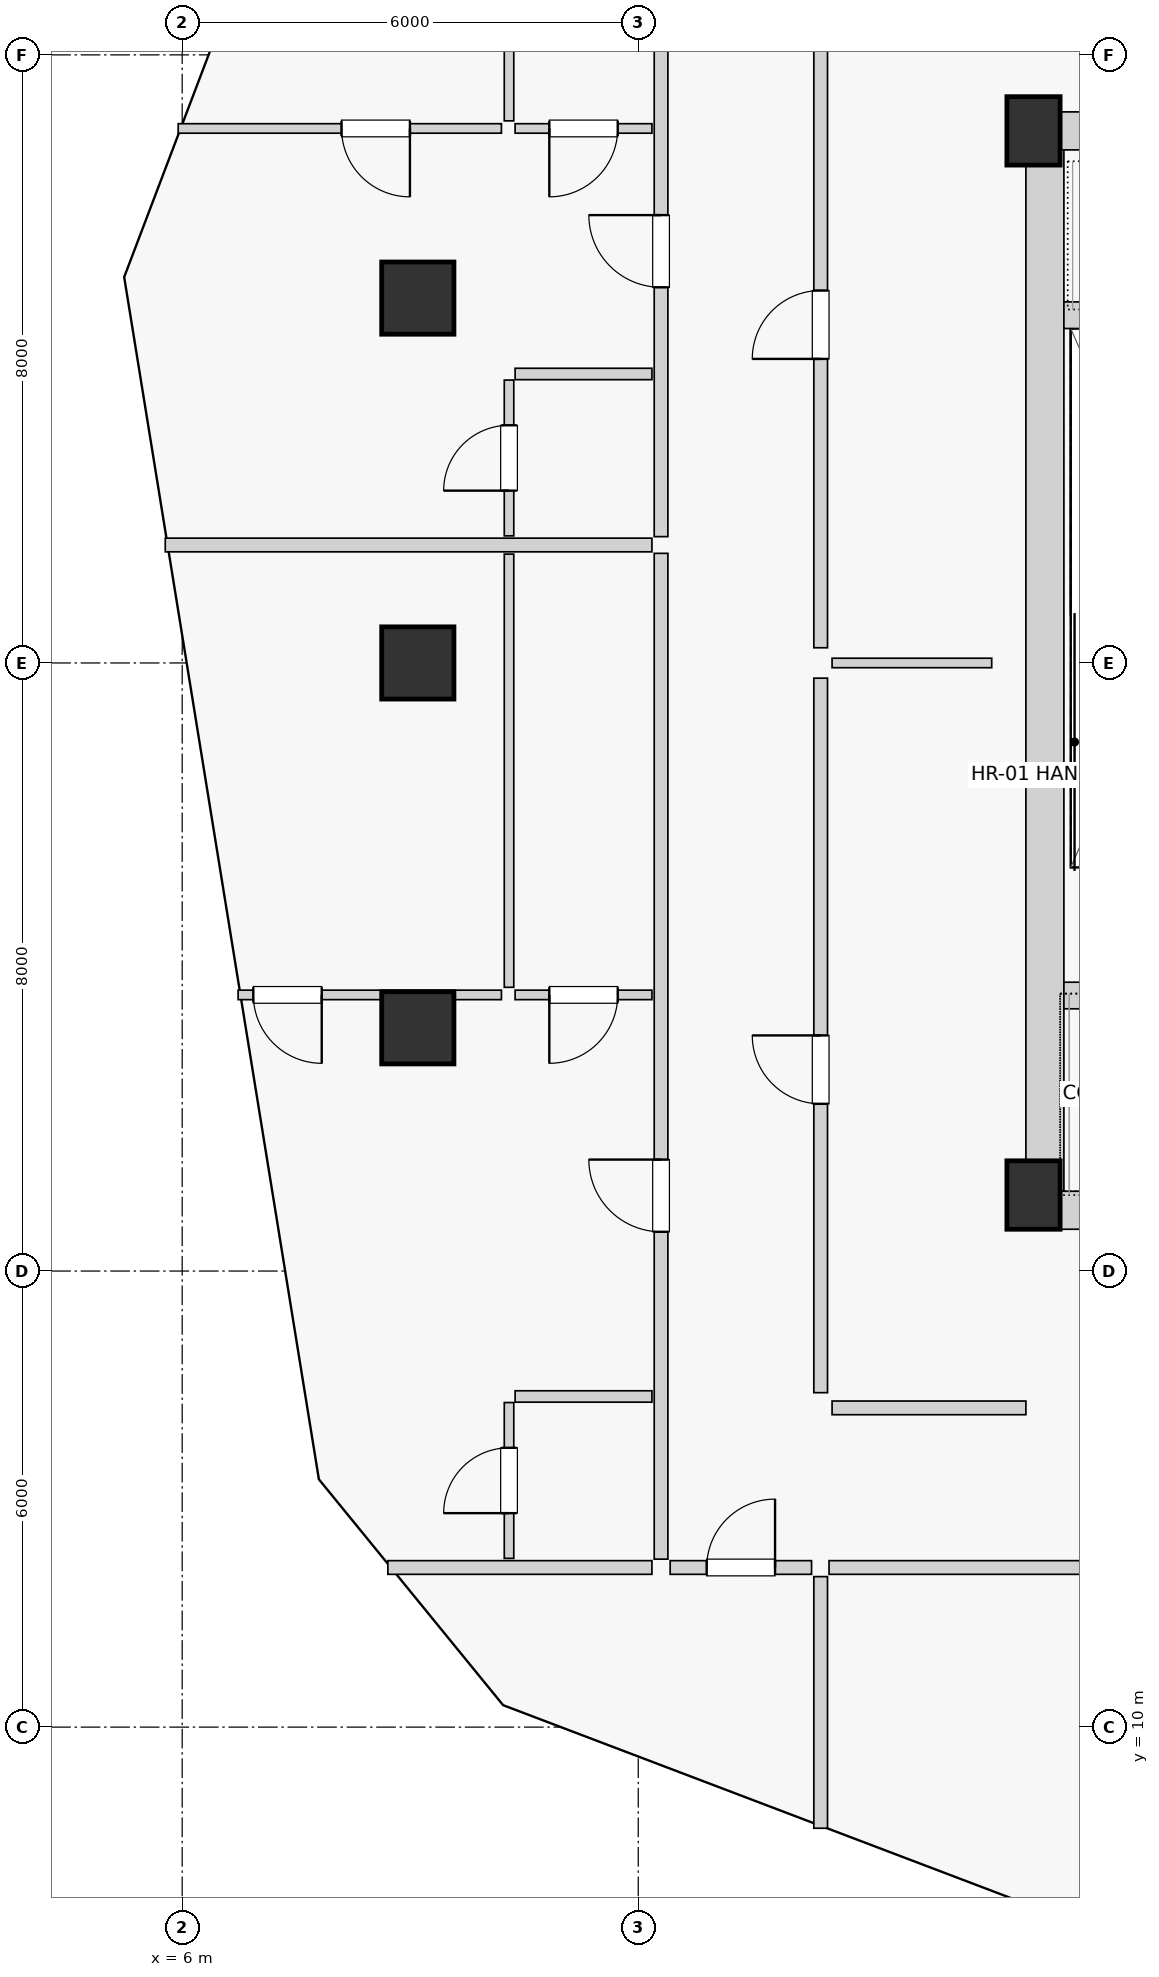
"""IFC4 building model, lengths in metres.
Left out: names, types, materials, properties, quantities, classifications, styles, units other than length and angle.
Written with IfcOpenShell. Run it as: python <this file> out.ifc"""

import sys

from ifc_helpers import new_model, si_unit, direction, frame, frame_2d, origin, origin_2d, place, context, subcontext, project, spatial, rectangle, extrude, source, transform, mapped, element, fill, save


model = new_model("IFC4")
c1 = context("Model", 3, precision=1e-05, world=origin(), true_north=direction((0.0, 1.0)))
c2 = subcontext(c1, "Body", "Model", "MODEL_VIEW")
j1 = project(units=[si_unit("LENGTHUNIT", "METRE"), si_unit("PLANEANGLEUNIT", "RADIAN")], contexts=[c1])
p1 = place(None, origin())
s1 = spatial("IfcSite", under=j1, at=p1, CompositionType="ELEMENT")
p2 = place(p1, origin())
s2 = spatial("IfcBuilding", under=s1, at=p2, CompositionType="ELEMENT")
p3 = place(p2, frame((0.0, 0.0, 174.35)))
s3 = spatial("IfcBuildingStorey", under=s2, at=p3, CompositionType="ELEMENT", Elevation=174.35)
for number, where, z_axis, x_axis in (
    (1, (17.2, 17.0, 0.0), (0.0, 0.0, 1.0), (1.0, 0.0, 0.0)),
    (2, (17.2, 31.0, 0.0), (0.0, 0.0, 1.0), (1.0, 0.0, 0.0)),
):
    element("IfcColumn", number, at=place(p3, frame(where, z_axis=z_axis, x_axis=x_axis)), inside=s3, PredefinedType="PILASTER", context=c2, shape_type="SweptSolid", body=[
        extrude(rectangle(XDim=0.7, YDim=0.9, at=origin_2d()), origin(), (0.0, 0.0, 1.0), 4.5),
    ])
for number, where, z_axis, x_axis in (
    (3, (9.1, 28.8, -0.32), (0.0, 0.0, 1.0), (1.0, 0.0, 0.0)),
    (4, (9.1, 24.0, -0.32), (0.0, 0.0, 1.0), (1.0, 0.0, 0.0)),
    (5, (9.1, 19.2, -0.32), (0.0, 0.0, 1.0), (1.0, 0.0, 0.0)),
):
    element("IfcColumn", number, at=place(p3, frame(where, z_axis=z_axis, x_axis=x_axis)), inside=s3, PredefinedType="COLUMN", context=c2, shape_type="SweptSolid", body=[
        extrude(rectangle(XDim=0.95, YDim=0.95, at=origin_2d()), origin(), (0.0, 0.0, 1.0), 4.82),
    ])
p4 = place(p3, frame((17.35, 16.8, 0.0), z_axis=(0.0, 0.0, 1.0), x_axis=(0.0, 1.0, 0.0)))
e6 = element("IfcWall", 6, at=p4, inside=s3, PredefinedType="SHEAR", context=c2, shape_type="SweptSolid", body=[
    extrude(rectangle(XDim=14.2, YDim=0.5, at=frame_2d((7.1, 0.0))), origin(), (0.0, 0.0, 1.0), 4.265),
])
p5 = place(p3, frame((17.2, 16.8, 0.0), z_axis=(0.0, 0.0, 1.0), x_axis=(1.0, 0.0, 0.0)))
e7 = element("IfcWall", 7, at=p5, inside=s3, PredefinedType="SHEAR", context=c2, shape_type="SweptSolid", body=[
    extrude(rectangle(XDim=5.85, YDim=0.5, at=frame_2d((2.925, 0.0))), origin(), (0.0, 0.0, 1.0), 4.265),
])
p6 = place(p5, frame((1.15, 0.0, 0.0)))
e8 = element("IfcOpeningElement", 8, at=p6, cuts=e7, PredefinedType="OPENING", context=c2, shape_type="SweptSolid", body=[
    extrude(rectangle(XDim=1.2, YDim=2.03, at=frame_2d((0.6, 1.015))), frame((0.0, 0.26, 0.0), z_axis=(0.0, -1.0, 0.0), x_axis=(1.0, 0.0, 0.0)), (0.0, 0.0, 1.0), 0.52),
])
p7 = place(p3, frame((17.2, 31.0, 0.0), z_axis=(0.0, 0.0, 1.0), x_axis=(1.0, 0.0, 0.0)))
e9 = element("IfcWall", 9, at=p7, inside=s3, PredefinedType="SHEAR", context=c2, shape_type="SweptSolid", body=[
    extrude(rectangle(XDim=3.8, YDim=0.5, at=frame_2d((1.9, 0.0))), origin(), (0.0, 0.0, 1.0), 4.265),
])
p8 = place(p7, frame((1.25, 0.0, 0.0)))
e10 = element("IfcOpeningElement", 10, at=p8, cuts=e9, PredefinedType="OPENING", context=c2, shape_type="SweptSolid", body=[
    extrude(rectangle(XDim=0.86, YDim=2.01, at=frame_2d((0.43, 1.005))), frame((0.0, 0.26, 0.0), z_axis=(0.0, -1.0, 0.0), x_axis=(1.0, 0.0, 0.0)), (0.0, 0.0, 1.0), 0.52),
])
p9 = place(p3, frame((17.6, 19.625, 0.0), z_axis=(0.0, 0.0, 1.0), x_axis=(1.0, 0.0, 0.0)))
e11 = element("IfcWall", 11, at=p9, inside=s3, PredefinedType="SHEAR", context=c2, shape_type="SweptSolid", body=[
    extrude(rectangle(XDim=3.375, YDim=0.35, at=frame_2d((1.688, 0.0))), origin(), (0.0, 0.0, 1.0), 4.265),
])
p10 = place(p9, frame((1.05, 0.0, 0.0)))
e12 = element("IfcOpeningElement", 12, at=p10, cuts=e11, PredefinedType="OPENING", context=c2, shape_type="SweptSolid", body=[
    extrude(rectangle(XDim=1.1, YDim=2.03, at=frame_2d((0.55, 1.015))), frame((0.0, 0.185, 0.0), z_axis=(0.0, -1.0, 0.0), x_axis=(1.0, 0.0, 0.0)), (0.0, 0.0, 1.0), 0.37),
])
p11 = place(p3, frame((17.6, 28.575, 0.0), z_axis=(0.0, 0.0, 1.0), x_axis=(1.0, 0.0, 0.0)))
e13 = element("IfcWall", 13, at=p11, inside=s3, PredefinedType="SHEAR", context=c2, shape_type="SweptSolid", body=[
    extrude(rectangle(XDim=3.375, YDim=0.35, at=frame_2d((1.688, 0.0))), origin(), (0.0, 0.0, 1.0), 4.265),
])
p12 = place(p3, frame((14.4, 14.4, 0.0), z_axis=(0.0, 0.0, 1.0), x_axis=(0.0, 1.0, 0.0)))
e14 = element("IfcWall", 14, at=p12, inside=s3, PredefinedType="PARTITIONING", context=c2, shape_type="SweptSolid", body=[
    extrude(rectangle(XDim=9.4, YDim=0.18, at=frame_2d((4.7, 0.0))), origin(), (0.0, 0.0, 1.0), 4.265),
])
p13 = place(p12, frame((3.8, 0.0, 0.0)))
e15 = element("IfcOpeningElement", 15, at=p13, cuts=e14, PredefinedType="OPENING", context=c2, shape_type="SweptSolid", body=[
    extrude(rectangle(XDim=0.9, YDim=2.01, at=frame_2d((0.45, 1.005))), frame((0.0, 0.1, 0.0), z_axis=(0.0, -1.0, 0.0), x_axis=(1.0, 0.0, 0.0)), (0.0, 0.0, 1.0), 0.2),
])
p14 = place(p3, frame((14.4, 24.2, 0.0), z_axis=(0.0, 0.0, 1.0), x_axis=(0.0, 1.0, 0.0)))
e16 = element("IfcWall", 16, at=p14, inside=s3, PredefinedType="PARTITIONING", context=c2, shape_type="SweptSolid", body=[
    extrude(rectangle(XDim=9.2, YDim=0.18, at=frame_2d((4.6, 0.0))), origin(), (0.0, 0.0, 1.0), 4.265),
])
p15 = place(p14, frame((3.8, 0.0, 0.0)))
e17 = element("IfcOpeningElement", 17, at=p15, cuts=e16, PredefinedType="OPENING", context=c2, shape_type="SweptSolid", body=[
    extrude(rectangle(XDim=0.9, YDim=2.01, at=frame_2d((0.45, 1.005))), frame((0.0, 0.1, 0.0), z_axis=(0.0, -1.0, 0.0), x_axis=(1.0, 0.0, 0.0)), (0.0, 0.0, 1.0), 0.2),
])
p16 = place(p3, frame((14.55, 24.0, 0.0), z_axis=(0.0, 0.0, 1.0), x_axis=(1.0, 0.0, 0.0)))
e18 = element("IfcWall", 18, at=p16, inside=s3, PredefinedType="PARTITIONING", context=c2, shape_type="SweptSolid", body=[
    extrude(rectangle(XDim=2.1, YDim=0.125, at=frame_2d((1.05, 0.0))), origin(), (0.0, 0.0, 1.0), 4.265),
])
p17 = place(p3, frame((14.55, 14.2, 0.0), z_axis=(0.0, 0.0, 1.0), x_axis=(1.0, 0.0, 0.0)))
e19 = element("IfcWall", 19, at=p17, inside=s3, PredefinedType="PARTITIONING", context=c2, shape_type="SweptSolid", body=[
    extrude(rectangle(XDim=2.55, YDim=0.18, at=frame_2d((1.275, 0.0))), origin(), (0.0, 0.0, 1.0), 4.265),
])
p18 = place(p3, frame((14.4, 11.98, 0.0), z_axis=(0.0, 0.0, 1.0), x_axis=(0.0, -1.0, 0.0)))
e20 = element("IfcWall", 20, at=p18, inside=s3, PredefinedType="PARTITIONING", context=c2, shape_type="SweptSolid", body=[
    extrude(rectangle(XDim=3.31, YDim=0.18, at=frame_2d((1.655, 0.0))), origin(), (0.0, 0.0, 1.0), 4.265),
])
p19 = place(p3, frame((14.51, 12.1, 0.0), z_axis=(0.0, 0.0, 1.0), x_axis=(1.0, 0.0, 0.0)))
e21 = element("IfcWall", 21, at=p19, inside=s3, PredefinedType="PARTITIONING", context=c2, shape_type="SweptSolid", body=[
    extrude(rectangle(XDim=10.724, YDim=0.18, at=frame_2d((5.362, 0.0))), origin(), (0.0, 0.0, 1.0), 4.265),
])
p20 = place(p19, frame((4.462, 0.0, 0.0)))
e22 = element("IfcOpeningElement", 22, at=p20, cuts=e21, PredefinedType="OPENING", context=c2, shape_type="SweptSolid", body=[
    extrude(rectangle(XDim=1.8, YDim=2.25, at=frame_2d((0.9, 1.125))), frame((0.0, 0.1, 0.0), z_axis=(0.0, -1.0, 0.0), x_axis=(1.0, 0.0, 0.0)), (0.0, 0.0, 1.0), 0.2),
])
p21 = place(p3, frame((12.18, 12.1, 0.0), z_axis=(0.0, 0.0, 1.0), x_axis=(-1.0, 0.0, 0.0)))
e23 = element("IfcWall", 23, at=p21, inside=s3, PredefinedType="PARTITIONING", context=c2, shape_type="SweptSolid", body=[
    extrude(rectangle(XDim=3.474, YDim=0.18, at=frame_2d((1.737, 0.0))), origin(), (0.0, 0.0, 1.0), 4.265),
])
p22 = place(p3, frame((12.3, 12.21, 0.0), z_axis=(0.0, 0.0, 1.0), x_axis=(0.0, 1.0, 0.0)))
e24 = element("IfcWall", 24, at=p22, inside=s3, PredefinedType="PARTITIONING", context=c2, shape_type="SweptSolid", body=[
    extrude(rectangle(XDim=13.232, YDim=0.18, at=frame_2d((6.616, 0.0))), origin(), (0.0, 0.0, 1.0), 4.265),
])
p23 = place(p22, frame((4.306, 0.0, 0.0)))
e25 = element("IfcOpeningElement", 25, at=p23, cuts=e24, PredefinedType="OPENING", context=c2, shape_type="SweptSolid", body=[
    extrude(rectangle(XDim=0.95, YDim=2.02, at=frame_2d((0.475, 1.01))), frame((0.0, 0.1, 0.0), z_axis=(0.0, -1.0, 0.0), x_axis=(1.0, 0.0, 0.0)), (0.0, 0.0, 1.0), 0.2),
])
p24 = place(p3, frame((12.18, 14.35, 0.0), z_axis=(0.0, 0.0, 1.0), x_axis=(-1.0, 0.0, 0.0)))
e26 = element("IfcWall", 26, at=p24, inside=s3, PredefinedType="PARTITIONING", context=c2, shape_type="SweptSolid", body=[
    extrude(rectangle(XDim=1.8, YDim=0.15, at=frame_2d((0.9, 0.0))), origin(), (0.0, 0.0, 1.0), 4.265),
])
p25 = place(p3, frame((10.3, 12.22, 0.0), z_axis=(0.0, 0.0, 1.0), x_axis=(0.0, 1.0, 0.0)))
e27 = element("IfcWall", 27, at=p25, inside=s3, PredefinedType="PARTITIONING", context=c2, shape_type="SweptSolid", body=[
    extrude(rectangle(XDim=2.05, YDim=0.125, at=frame_2d((1.025, 0.0))), origin(), (0.0, 0.0, 1.0), 4.265),
])
p26 = place(p25, frame((0.595, 0.0, 0.0)))
e28 = element("IfcOpeningElement", 28, at=p26, cuts=e27, PredefinedType="OPENING", context=c2, shape_type="SweptSolid", body=[
    extrude(rectangle(XDim=0.86, YDim=2.01, at=frame_2d((0.43, 1.005))), frame((0.0, 0.073, 0.0), z_axis=(0.0, -1.0, 0.0), x_axis=(1.0, 0.0, 0.0)), (0.0, 0.0, 1.0), 0.145),
])
p27 = place(p3, frame((12.18, 19.633, 0.0), z_axis=(0.0, 0.0, 1.0), x_axis=(-1.0, 0.0, 0.0)))
e29 = element("IfcWall", 29, at=p27, inside=s3, PredefinedType="PARTITIONING", context=c2, shape_type="SweptSolid", body=[
    extrude(rectangle(XDim=1.8, YDim=0.125, at=frame_2d((0.9, 0.0))), origin(), (0.0, 0.0, 1.0), 4.265),
])
p28 = place(p27, frame((0.45, 0.0, 0.0)))
e30 = element("IfcOpeningElement", 30, at=p28, cuts=e29, PredefinedType="OPENING", context=c2, shape_type="SweptSolid", body=[
    extrude(rectangle(XDim=0.9, YDim=2.01, at=frame_2d((0.45, 1.005))), frame((0.0, 0.073, 0.0), z_axis=(0.0, -1.0, 0.0), x_axis=(1.0, 0.0, 0.0)), (0.0, 0.0, 1.0), 0.145),
])
p29 = place(p3, frame((10.3, 19.733, 0.0), z_axis=(0.0, 0.0, 1.0), x_axis=(0.0, 1.0, 0.0)))
e31 = element("IfcWall", 31, at=p29, inside=s3, PredefinedType="PARTITIONING", context=c2, shape_type="SweptSolid", body=[
    extrude(rectangle(XDim=5.699, YDim=0.125, at=frame_2d((2.85, 0.0))), origin(), (0.0, 0.0, 1.0), 4.265),
])
p30 = place(p3, frame((10.2, 19.633, 0.0), z_axis=(0.0, 0.0, 1.0), x_axis=(-1.0, 0.0, 0.0)))
e32 = element("IfcWall", 32, at=p30, inside=s3, PredefinedType="PARTITIONING", context=c2, shape_type="SweptSolid", body=[
    extrude(rectangle(XDim=3.464, YDim=0.125, at=frame_2d((1.732, 0.0))), origin(), (0.0, 0.0, 1.0), 3.719),
])
p31 = place(p30, frame((2.364, 0.0, 0.0)))
e33 = element("IfcOpeningElement", 33, at=p31, cuts=e32, PredefinedType="OPENING", context=c2, shape_type="SweptSolid", body=[
    extrude(rectangle(XDim=0.9, YDim=2.01, at=frame_2d((0.45, 1.005))), frame((0.0, 0.073, 0.0), z_axis=(0.0, -1.0, 0.0), x_axis=(1.0, 0.0, 0.0)), (0.0, 0.0, 1.0), 0.145),
])
p32 = place(p3, frame((12.18, 25.552, 0.0), z_axis=(0.0, 0.0, 1.0), x_axis=(-1.0, 0.0, 0.0)))
e34 = element("IfcWall", 34, at=p32, inside=s3, PredefinedType="PARTITIONING", context=c2, shape_type="SweptSolid", body=[
    extrude(rectangle(XDim=6.403, YDim=0.18, at=frame_2d((3.201, 0.0))), origin(), (0.0, 0.0, 1.0), 4.265),
])
p33 = place(p3, frame((12.3, 25.662, 0.0), z_axis=(0.0, 0.0, 1.0), x_axis=(0.0, 1.0, 0.0)))
e35 = element("IfcWall", 35, at=p33, inside=s3, PredefinedType="PARTITIONING", context=c2, shape_type="SweptSolid", body=[
    extrude(rectangle(XDim=9.928, YDim=0.18, at=frame_2d((4.964, 0.0))), origin(), (0.0, 0.0, 1.0), 4.265),
])
p34 = place(p33, frame((3.28, 0.0, 0.0)))
e36 = element("IfcOpeningElement", 36, at=p34, cuts=e35, PredefinedType="OPENING", context=c2, shape_type="SweptSolid", body=[
    extrude(rectangle(XDim=0.95, YDim=2.02, at=frame_2d((0.475, 1.01))), frame((0.0, 0.1, 0.0), z_axis=(0.0, -1.0, 0.0), x_axis=(1.0, 0.0, 0.0)), (0.0, 0.0, 1.0), 0.2),
])
p35 = place(p3, frame((12.18, 27.802, 0.0), z_axis=(0.0, 0.0, 1.0), x_axis=(-1.0, 0.0, 0.0)))
e37 = element("IfcWall", 37, at=p35, inside=s3, PredefinedType="PARTITIONING", context=c2, shape_type="SweptSolid", body=[
    extrude(rectangle(XDim=1.8, YDim=0.15, at=frame_2d((0.9, 0.0))), origin(), (0.0, 0.0, 1.0), 4.265),
])
p36 = place(p3, frame((10.3, 25.672, 0.0), z_axis=(0.0, 0.0, 1.0), x_axis=(0.0, 1.0, 0.0)))
e38 = element("IfcWall", 38, at=p36, inside=s3, PredefinedType="PARTITIONING", context=c2, shape_type="SweptSolid", body=[
    extrude(rectangle(XDim=2.05, YDim=0.125, at=frame_2d((1.025, 0.0))), origin(), (0.0, 0.0, 1.0), 4.265),
])
p37 = place(p36, frame((0.595, 0.0, 0.0)))
e39 = element("IfcOpeningElement", 39, at=p37, cuts=e38, PredefinedType="OPENING", context=c2, shape_type="SweptSolid", body=[
    extrude(rectangle(XDim=0.86, YDim=2.01, at=frame_2d((0.43, 1.005))), frame((0.0, 0.073, 0.0), z_axis=(0.0, -1.0, 0.0), x_axis=(1.0, 0.0, 0.0)), (0.0, 0.0, 1.0), 0.145),
])
p38 = place(p3, frame((12.18, 31.032, 0.0), z_axis=(0.0, 0.0, 1.0), x_axis=(-1.0, 0.0, 0.0)))
e40 = element("IfcWall", 40, at=p38, inside=s3, PredefinedType="PARTITIONING", context=c2, shape_type="SweptSolid", body=[
    extrude(rectangle(XDim=1.8, YDim=0.125, at=frame_2d((0.9, 0.0))), origin(), (0.0, 0.0, 1.0), 4.265),
])
p39 = place(p38, frame((0.45, 0.0, 0.0)))
e41 = element("IfcOpeningElement", 41, at=p39, cuts=e40, PredefinedType="OPENING", context=c2, shape_type="SweptSolid", body=[
    extrude(rectangle(XDim=0.9, YDim=2.01, at=frame_2d((0.45, 1.005))), frame((0.0, 0.073, 0.0), z_axis=(0.0, -1.0, 0.0), x_axis=(1.0, 0.0, 0.0)), (0.0, 0.0, 1.0), 0.145),
])
p40 = place(p3, frame((10.3, 31.132, 0.0), z_axis=(0.0, 0.0, 1.0), x_axis=(0.0, 1.0, 0.0)))
e42 = element("IfcWall", 42, at=p40, inside=s3, PredefinedType="PARTITIONING", context=c2, shape_type="SweptSolid", body=[
    extrude(rectangle(XDim=4.448, YDim=0.125, at=frame_2d((2.224, 0.0))), origin(), (0.0, 0.0, 1.0), 4.265),
])
p41 = place(p3, frame((10.2, 31.032, 0.0), z_axis=(0.0, 0.0, 1.0), x_axis=(-1.0, 0.0, 0.0)))
e43 = element("IfcWall", 43, at=p41, inside=s3, PredefinedType="PARTITIONING", context=c2, shape_type="SweptSolid", body=[
    extrude(rectangle(XDim=4.252, YDim=0.125, at=frame_2d((2.126, 0.0))), origin(), (0.0, 0.0, 1.0), 4.265),
])
p42 = place(p41, frame((1.204, 0.0, 0.0)))
e44 = element("IfcOpeningElement", 44, at=p42, cuts=e43, PredefinedType="OPENING", context=c2, shape_type="SweptSolid", body=[
    extrude(rectangle(XDim=0.9, YDim=2.01, at=frame_2d((0.45, 1.005))), frame((0.0, 0.073, 0.0), z_axis=(0.0, -1.0, 0.0), x_axis=(1.0, 0.0, 0.0)), (0.0, 0.0, 1.0), 0.145),
])
p43 = place(p3, frame((12.42, 12.1, 0.0), z_axis=(0.0, 0.0, 1.0), x_axis=(1.0, 0.0, 0.0)))
e45 = element("IfcWall", 45, at=p43, inside=s3, PredefinedType="PARTITIONING", context=c2, shape_type="SweptSolid", body=[
    extrude(rectangle(XDim=1.86, YDim=0.18, at=frame_2d((0.93, 0.0))), origin(), (0.0, 0.0, 1.0), 4.265),
])
p44 = place(p43, frame((0.48, 0.0, 0.0)))
e46 = element("IfcOpeningElement", 46, at=p44, cuts=e45, PredefinedType="OPENING", context=c2, shape_type="SweptSolid", body=[
    extrude(rectangle(XDim=0.9, YDim=2.01, at=frame_2d((0.45, 1.005))), frame((0.0, 0.1, 0.0), z_axis=(0.0, -1.0, 0.0), x_axis=(1.0, 0.0, 0.0)), (0.0, 0.0, 1.0), 0.2),
])
m1 = source(origin(), c2, "Body", "SweptSolid", [
    extrude(rectangle(XDim=0.9, YDim=2.01, at=frame_2d((0.45, 1.005))), frame((0.0, 0.025, 0.0), z_axis=(0.0, -1.0, 0.0), x_axis=(1.0, 0.0, 0.0)), (0.0, 0.0, 1.0), 0.05),
])
p45 = place(p13, origin())
e47 = element("IfcDoor", 47, at=p45, inside=s3, OperationType="SINGLE_SWING_RIGHT", PredefinedType="DOOR", context=c2, shape_type="MappedRepresentation", body=[
    mapped(m1, transform((0.0, 0.0, 0.0), scale=1.0)),
])
fill(e15, e47)
p46 = place(p15, origin())
e48 = element("IfcDoor", 48, at=p46, inside=s3, OperationType="SINGLE_SWING_LEFT", PredefinedType="DOOR", context=c2, shape_type="MappedRepresentation", body=[
    mapped(m1, transform((0.0, 0.0, 0.0), scale=1.0)),
])
fill(e17, e48)
m2 = source(origin(), c2, "Body", "SweptSolid", [
    extrude(rectangle(XDim=0.95, YDim=2.02, at=frame_2d((0.475, 1.01))), frame((0.0, 0.025, 0.0), z_axis=(0.0, -1.0, 0.0), x_axis=(1.0, 0.0, 0.0)), (0.0, 0.0, 1.0), 0.05),
])
p47 = place(p23, origin())
e49 = element("IfcDoor", 49, at=p47, inside=s3, OperationType="SINGLE_SWING_RIGHT", PredefinedType="DOOR", context=c2, shape_type="MappedRepresentation", body=[
    mapped(m2, transform((0.0, 0.0, 0.0), scale=1.0)),
])
fill(e25, e49)
m3 = source(origin(), c2, "Body", "SweptSolid", [
    extrude(rectangle(XDim=0.86, YDim=2.01, at=frame_2d((0.43, 1.005))), frame((0.0, 0.025, 0.0), z_axis=(0.0, -1.0, 0.0), x_axis=(1.0, 0.0, 0.0)), (0.0, 0.0, 1.0), 0.05),
])
p48 = place(p26, origin())
e50 = element("IfcDoor", 50, at=p48, inside=s3, OperationType="SINGLE_SWING_LEFT", PredefinedType="DOOR", context=c2, shape_type="MappedRepresentation", body=[
    mapped(m3, transform((0.0, 0.0, 0.0), scale=1.0)),
])
fill(e28, e50)
p49 = place(p28, origin())
e51 = element("IfcDoor", 51, at=p49, inside=s3, OperationType="SINGLE_SWING_RIGHT", PredefinedType="DOOR", context=c2, shape_type="MappedRepresentation", body=[
    mapped(m1, transform((0.0, 0.0, 0.0), scale=1.0)),
])
fill(e30, e51)
p50 = place(p31, origin())
e52 = element("IfcDoor", 52, at=p50, inside=s3, OperationType="SINGLE_SWING_LEFT", PredefinedType="DOOR", context=c2, shape_type="MappedRepresentation", body=[
    mapped(m1, transform((0.0, 0.0, 0.0), scale=1.0)),
])
fill(e33, e52)
p51 = place(p34, origin())
e53 = element("IfcDoor", 53, at=p51, inside=s3, OperationType="SINGLE_SWING_RIGHT", PredefinedType="DOOR", context=c2, shape_type="MappedRepresentation", body=[
    mapped(m2, transform((0.0, 0.0, 0.0), scale=1.0)),
])
fill(e36, e53)
p52 = place(p37, origin())
e54 = element("IfcDoor", 54, at=p52, inside=s3, OperationType="SINGLE_SWING_LEFT", PredefinedType="DOOR", context=c2, shape_type="MappedRepresentation", body=[
    mapped(m3, transform((0.0, 0.0, 0.0), scale=1.0)),
])
fill(e39, e54)
p53 = place(p39, origin())
e55 = element("IfcDoor", 55, at=p53, inside=s3, OperationType="SINGLE_SWING_RIGHT", PredefinedType="DOOR", context=c2, shape_type="MappedRepresentation", body=[
    mapped(m1, transform((0.0, 0.0, 0.0), scale=1.0)),
])
fill(e41, e55)
p54 = place(p42, origin())
e56 = element("IfcDoor", 56, at=p54, inside=s3, OperationType="SINGLE_SWING_LEFT", PredefinedType="DOOR", context=c2, shape_type="MappedRepresentation", body=[
    mapped(m1, transform((0.0, 0.0, 0.0), scale=1.0)),
])
fill(e44, e56)
p55 = place(p44, origin())
e57 = element("IfcDoor", 57, at=p55, inside=s3, OperationType="SINGLE_SWING_RIGHT", PredefinedType="DOOR", context=c2, shape_type="MappedRepresentation", body=[
    mapped(m1, transform((0.0, 0.0, 0.0), scale=1.0)),
])
fill(e46, e57)
save(model, sys.argv[1])
